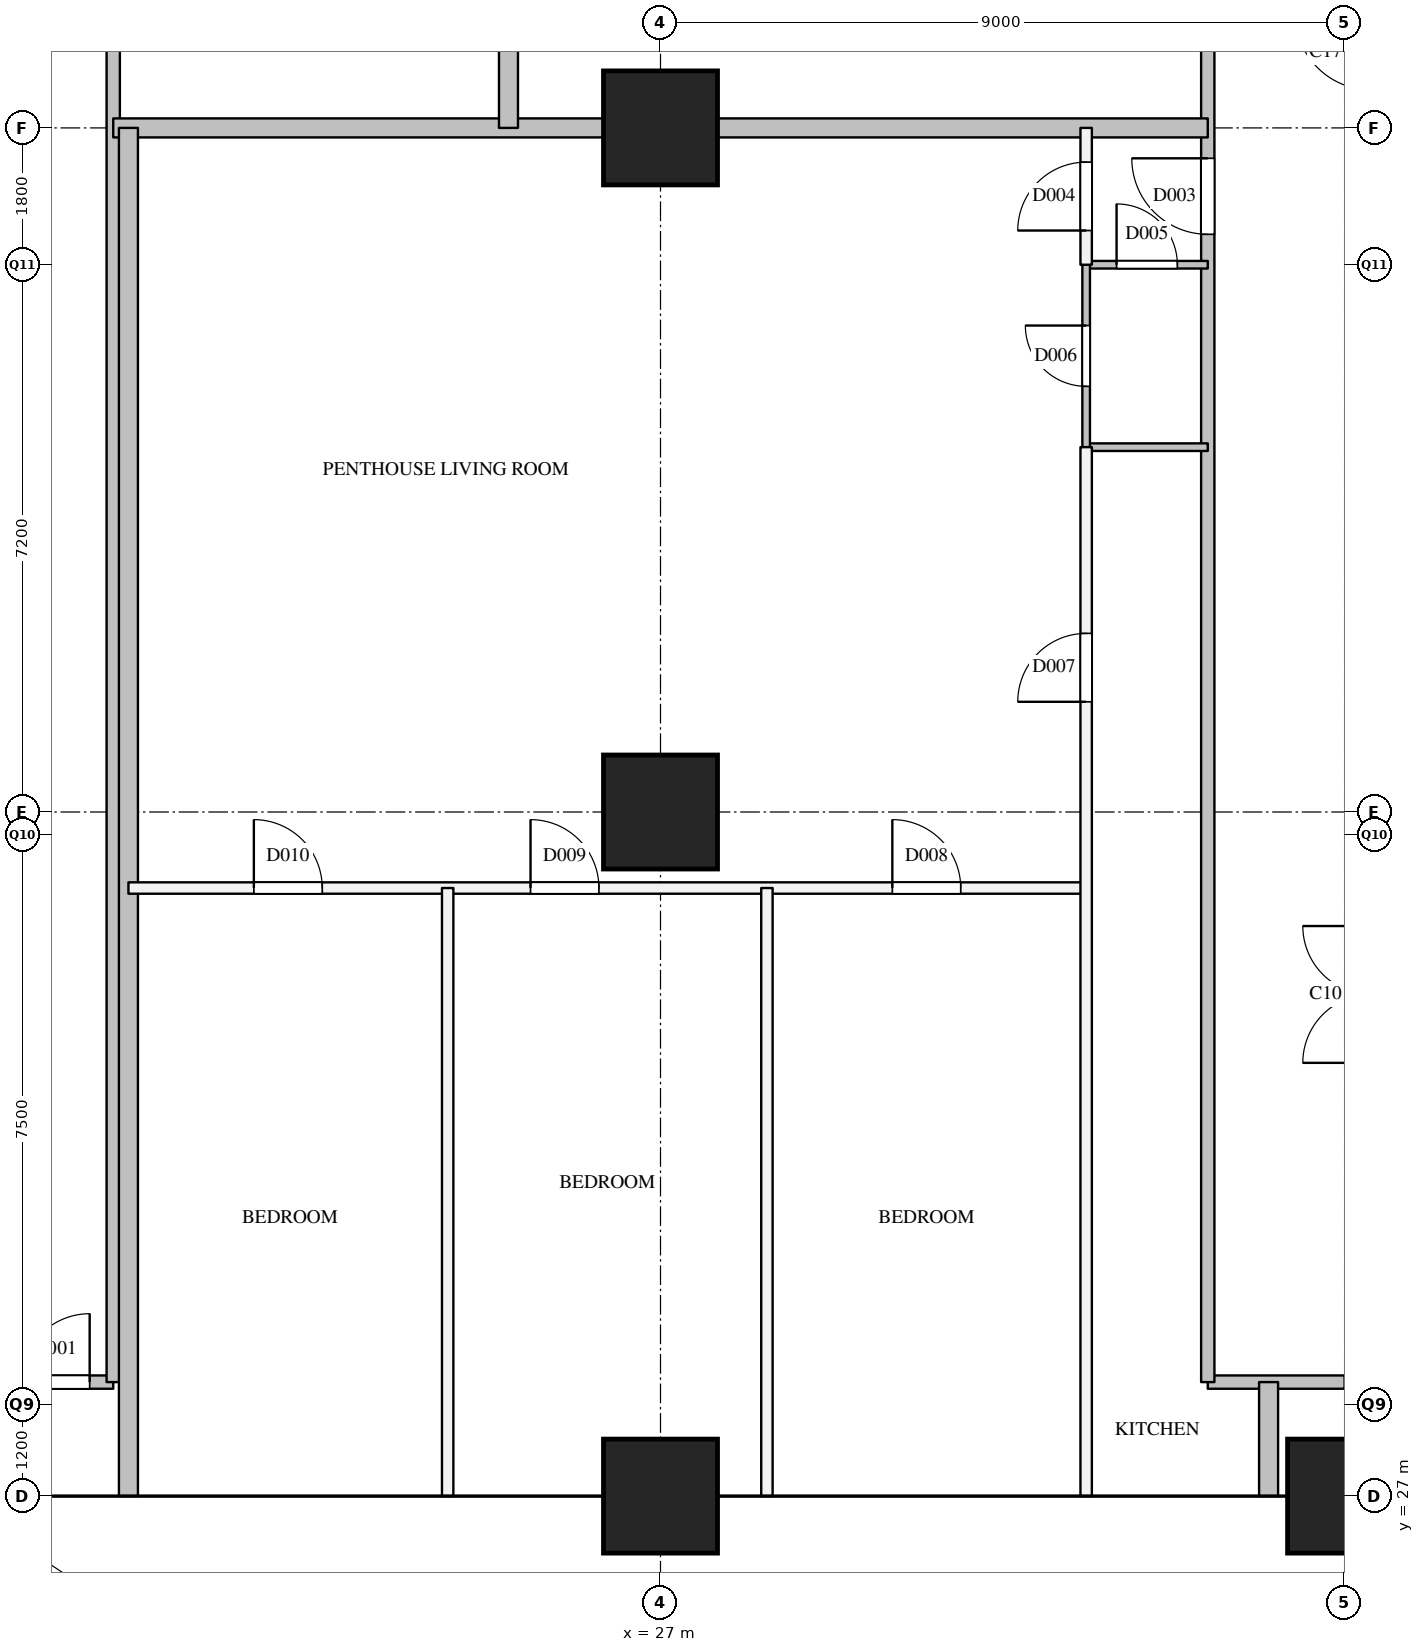
"""IFC4 building model, lengths in metres.
Left out: names, types, materials, properties, quantities, classifications, styles, units other than length and angle.
Written with IfcOpenShell. Run it as: python <this file> out.ifc"""

import sys

from ifc_helpers import new_model, si_unit, direction, frame, frame_2d, origin, origin_2d, place, context, subcontext, project, spatial, rectangle, extrude, element, fill, save


model = new_model("IFC4")
c1 = context("Model", 3, precision=1e-05, world=origin(), true_north=direction((0.0, 1.0)))
c2 = subcontext(c1, "Body", "Model", "MODEL_VIEW")
j1 = project(units=[si_unit("LENGTHUNIT", "METRE"), si_unit("PLANEANGLEUNIT", "RADIAN")], contexts=[c1])
p1 = place(None, origin())
s1 = spatial("IfcSite", under=j1, at=p1, CompositionType="ELEMENT")
p2 = place(p1, origin())
s2 = spatial("IfcBuilding", under=s1, at=p2, CompositionType="ELEMENT")
p3 = place(p2, frame((0.0, 0.0, 170.0)))
s3 = spatial("IfcBuildingStorey", under=s2, at=p3, CompositionType="ELEMENT", Elevation=170.0)
for number, where, z_axis, x_axis in (
    (1, (27.0, 27.0, 0.0), (0.0, 0.0, 1.0), (1.0, 0.0, 0.0)),
    (2, (27.0, 36.0, 0.0), (0.0, 0.0, 1.0), (1.0, 0.0, 0.0)),
    (3, (27.0, 45.0, 0.0), (0.0, 0.0, 1.0), (1.0, 0.0, 0.0)),
    (4, (36.0, 27.0, 0.0), (0.0, 0.0, 1.0), (1.0, 0.0, 0.0)),
):
    element("IfcColumn", number, at=place(p3, frame(where, z_axis=z_axis, x_axis=x_axis)), inside=s3, PredefinedType="COLUMN", context=c2, shape_type="SweptSolid", body=[
        extrude(rectangle(XDim=1.5, YDim=1.5, at=origin_2d()), origin(), (0.0, 0.0, 1.0), 3.9),
    ])
p4 = place(p3, frame((18.0, 28.5, 0.0), z_axis=(0.0, 0.0, 1.0), x_axis=(1.0, 0.0, 0.0)))
e5 = element("IfcWall", 5, at=p4, inside=s3, PredefinedType="PARTITIONING", context=c2, shape_type="SweptSolid", body=[
    extrude(rectangle(XDim=1.8, YDim=0.175, at=frame_2d((0.9, 0.0))), origin(), (0.0, 0.0, 1.0), 3.6),
])
p5 = place(p4, frame((0.59, 0.0, 0.0)))
e6 = element("IfcOpeningElement", 6, at=p5, cuts=e5, PredefinedType="OPENING", context=c2, shape_type="SweptSolid", body=[
    extrude(rectangle(XDim=0.9, YDim=2.1, at=frame_2d((0.45, 1.05))), frame((0.0, 0.097, 0.0), z_axis=(0.0, -1.0, 0.0), x_axis=(1.0, 0.0, 0.0)), (0.0, 0.0, 1.0), 0.195),
])
p6 = place(p3, frame((34.2, 28.5, 0.0), z_axis=(0.0, 0.0, 1.0), x_axis=(1.0, 0.0, 0.0)))
e7 = element("IfcWall", 7, at=p6, inside=s3, PredefinedType="PARTITIONING", context=c2, shape_type="SweptSolid", body=[
    extrude(rectangle(XDim=1.8, YDim=0.175, at=frame_2d((0.9, 0.0))), origin(), (0.0, 0.0, 1.0), 3.6),
])
p7 = place(p3, frame((19.8, 28.5, 0.0), z_axis=(0.0, 0.0, 1.0), x_axis=(0.0, 1.0, 0.0)))
e8 = element("IfcWall", 8, at=p7, inside=s3, PredefinedType="PARTITIONING", context=c2, shape_type="SweptSolid", body=[
    extrude(rectangle(XDim=23.3, YDim=0.175, at=frame_2d((11.65, 0.0))), origin(), (0.0, 0.0, 1.0), 3.6),
])
p8 = place(p3, frame((34.2, 28.5, 0.0), z_axis=(0.0, 0.0, 1.0), x_axis=(0.0, 1.0, 0.0)))
e9 = element("IfcWall", 9, at=p8, inside=s3, PredefinedType="PARTITIONING", context=c2, shape_type="SweptSolid", body=[
    extrude(rectangle(XDim=23.3, YDim=0.175, at=frame_2d((11.65, 0.0))), origin(), (0.0, 0.0, 1.0), 3.6),
])
p9 = place(p8, frame((15.1, 0.0, 0.0)))
e10 = element("IfcOpeningElement", 10, at=p9, cuts=e9, PredefinedType="OPENING", context=c2, shape_type="SweptSolid", body=[
    extrude(rectangle(XDim=1.0, YDim=2.1, at=frame_2d((0.5, 1.05))), frame((0.0, 0.097, 0.0), z_axis=(0.0, -1.0, 0.0), x_axis=(1.0, 0.0, 0.0)), (0.0, 0.0, 1.0), 0.195),
])
p10 = place(p3, frame((20.0, 35.0, 0.0), z_axis=(0.0, 0.0, 1.0), x_axis=(1.0, 0.0, 0.0)))
e11 = element("IfcWall", 11, at=p10, inside=s3, PredefinedType="PARTITIONING", context=c2, shape_type="SweptSolid", body=[
    extrude(rectangle(XDim=12.6, YDim=0.15, at=frame_2d((6.3, 0.0))), origin(), (0.0, 0.0, 1.0), 2.6),
])
p11 = place(p10, frame((10.05, 0.0, 0.0)))
e12 = element("IfcOpeningElement", 12, at=p11, cuts=e11, PredefinedType="OPENING", context=c2, shape_type="SweptSolid", body=[
    extrude(rectangle(XDim=0.9, YDim=2.1, at=frame_2d((0.45, 1.05))), frame((0.0, 0.085, 0.0), z_axis=(0.0, -1.0, 0.0), x_axis=(1.0, 0.0, 0.0)), (0.0, 0.0, 1.0), 0.17),
])
p12 = place(p10, frame((5.29, 0.0, 0.0)))
e13 = element("IfcOpeningElement", 13, at=p12, cuts=e11, PredefinedType="OPENING", context=c2, shape_type="SweptSolid", body=[
    extrude(rectangle(XDim=0.9, YDim=2.1, at=frame_2d((0.45, 1.05))), frame((0.0, 0.085, 0.0), z_axis=(0.0, -1.0, 0.0), x_axis=(1.0, 0.0, 0.0)), (0.0, 0.0, 1.0), 0.17),
])
p13 = place(p10, frame((1.65, 0.0, 0.0)))
e14 = element("IfcOpeningElement", 14, at=p13, cuts=e11, PredefinedType="OPENING", context=c2, shape_type="SweptSolid", body=[
    extrude(rectangle(XDim=0.9, YDim=2.1, at=frame_2d((0.45, 1.05))), frame((0.0, 0.085, 0.0), z_axis=(0.0, -1.0, 0.0), x_axis=(1.0, 0.0, 0.0)), (0.0, 0.0, 1.0), 0.17),
])
for number, where, z_axis, x_axis in (
    (15, (24.2, 27.0, 0.0), (0.0, 0.0, 1.0), (0.0, 1.0, 0.0)),
    (16, (28.4, 27.0, 0.0), (0.0, 0.0, 1.0), (0.0, 1.0, 0.0)),
):
    element("IfcWall", number, at=place(p3, frame(where, z_axis=z_axis, x_axis=x_axis)), inside=s3, PredefinedType="PARTITIONING", context=c2, shape_type="SweptSolid", body=[
        extrude(rectangle(XDim=8.0, YDim=0.15, at=frame_2d((4.0, 0.0))), origin(), (0.0, 0.0, 1.0), 2.6),
    ])
p14 = place(p3, frame((32.6, 27.0, 0.0), z_axis=(0.0, 0.0, 1.0), x_axis=(0.0, 1.0, 0.0)))
e17 = element("IfcWall", 17, at=p14, inside=s3, PredefinedType="PARTITIONING", context=c2, shape_type="SweptSolid", body=[
    extrude(rectangle(XDim=13.8, YDim=0.15, at=frame_2d((6.9, 0.0))), origin(), (0.0, 0.0, 1.0), 2.6),
])
p15 = place(p14, frame((10.45, 0.0, 0.0)))
e18 = element("IfcOpeningElement", 18, at=p15, cuts=e17, PredefinedType="OPENING", context=c2, shape_type="SweptSolid", body=[
    extrude(rectangle(XDim=0.9, YDim=2.1, at=frame_2d((0.45, 1.05))), frame((0.0, 0.085, 0.0), z_axis=(0.0, -1.0, 0.0), x_axis=(1.0, 0.0, 0.0)), (0.0, 0.0, 1.0), 0.17),
])
p16 = place(p3, frame((32.6, 43.2, 0.0), z_axis=(0.0, 0.0, 1.0), x_axis=(0.0, 1.0, 0.0)))
e19 = element("IfcWall", 19, at=p16, inside=s3, PredefinedType="PARTITIONING", context=c2, shape_type="SweptSolid", body=[
    extrude(rectangle(XDim=1.8, YDim=0.15, at=frame_2d((0.9, 0.0))), origin(), (0.0, 0.0, 1.0), 3.6),
])
p17 = place(p16, frame((0.45, 0.0, 0.0)))
e20 = element("IfcOpeningElement", 20, at=p17, cuts=e19, PredefinedType="OPENING", context=c2, shape_type="SweptSolid", body=[
    extrude(rectangle(XDim=0.9, YDim=2.1, at=frame_2d((0.45, 1.05))), frame((0.0, 0.085, 0.0), z_axis=(0.0, -1.0, 0.0), x_axis=(1.0, 0.0, 0.0)), (0.0, 0.0, 1.0), 0.17),
])
p18 = place(p3, frame((19.8, 45.0, 0.0), z_axis=(0.0, 0.0, 1.0), x_axis=(1.0, 0.0, 0.0)))
e21 = element("IfcWall", 21, at=p18, inside=s3, PredefinedType="PARTITIONING", context=c2, shape_type="SweptSolid", body=[
    extrude(rectangle(XDim=14.4, YDim=0.25, at=frame_2d((7.2, 0.0))), origin(), (0.0, 0.0, 1.0), 3.6),
])
p19 = place(p3, frame((20.0, 27.0, 0.0), z_axis=(0.0, 0.0, 1.0), x_axis=(0.0, 1.0, 0.0)))
e22 = element("IfcWall", 22, at=p19, inside=s3, PredefinedType="PARTITIONING", context=c2, shape_type="SweptSolid", body=[
    extrude(rectangle(XDim=18.0, YDim=0.25, at=frame_2d((9.0, 0.0))), origin(), (0.0, 0.0, 1.0), 2.6),
])
p20 = place(p3, frame((25.0, 45.0, 0.0), z_axis=(0.0, 0.0, 1.0), x_axis=(0.0, 1.0, 0.0)))
e23 = element("IfcWall", 23, at=p20, inside=s3, PredefinedType="PARTITIONING", context=c2, shape_type="SweptSolid", body=[
    extrude(rectangle(XDim=9.0, YDim=0.25, at=frame_2d((4.5, 0.0))), origin(), (0.0, 0.0, 1.0), 2.6),
])
p21 = place(p3, frame((35.0, 27.0, 0.0), z_axis=(0.0, 0.0, 1.0), x_axis=(0.0, 1.0, 0.0)))
e24 = element("IfcWall", 24, at=p21, inside=s3, PredefinedType="PARTITIONING", context=c2, shape_type="SweptSolid", body=[
    extrude(rectangle(XDim=1.5, YDim=0.25, at=frame_2d((0.75, 0.0))), origin(), (0.0, 0.0, 1.0), 2.6),
])
p22 = place(p3, frame((32.6, 40.8, 0.0), z_axis=(0.0, 0.0, 1.0), x_axis=(1.0, 0.0, 0.0)))
e25 = element("IfcWall", 25, at=p22, inside=s3, PredefinedType="PARTITIONING", context=c2, shape_type="SweptSolid", body=[
    extrude(rectangle(XDim=1.6, YDim=0.1, at=frame_2d((0.8, 0.0))), origin(), (0.0, 0.0, 1.0), 3.6),
])
p23 = place(p3, frame((32.6, 43.2, 0.0), z_axis=(0.0, 0.0, 1.0), x_axis=(1.0, 0.0, 0.0)))
e26 = element("IfcWall", 26, at=p23, inside=s3, PredefinedType="PARTITIONING", context=c2, shape_type="SweptSolid", body=[
    extrude(rectangle(XDim=1.6, YDim=0.1, at=frame_2d((0.8, 0.0))), origin(), (0.0, 0.0, 1.0), 3.6),
])
p24 = place(p23, frame((0.4, 0.0, 0.0)))
e27 = element("IfcOpeningElement", 27, at=p24, cuts=e26, PredefinedType="OPENING", context=c2, shape_type="SweptSolid", body=[
    extrude(rectangle(XDim=0.8, YDim=2.1, at=frame_2d((0.4, 1.05))), frame((0.0, 0.06, 0.0), z_axis=(0.0, -1.0, 0.0), x_axis=(1.0, 0.0, 0.0)), (0.0, 0.0, 1.0), 0.12),
])
p25 = place(p3, frame((32.6, 40.8, 0.0), z_axis=(0.0, 0.0, 1.0), x_axis=(0.0, 1.0, 0.0)))
e28 = element("IfcWall", 28, at=p25, inside=s3, PredefinedType="PARTITIONING", context=c2, shape_type="SweptSolid", body=[
    extrude(rectangle(XDim=2.4, YDim=0.1, at=frame_2d((1.2, 0.0))), origin(), (0.0, 0.0, 1.0), 3.6),
])
p26 = place(p25, frame((0.8, 0.0, 0.0)))
e29 = element("IfcOpeningElement", 29, at=p26, cuts=e28, PredefinedType="OPENING", context=c2, shape_type="SweptSolid", body=[
    extrude(rectangle(XDim=0.8, YDim=2.1, at=frame_2d((0.4, 1.05))), frame((0.0, 0.06, 0.0), z_axis=(0.0, -1.0, 0.0), x_axis=(1.0, 0.0, 0.0)), (0.0, 0.0, 1.0), 0.12),
])
p27 = place(p5, origin())
e30 = element("IfcDoor", 30, at=p27, inside=s3, OperationType="SINGLE_SWING_RIGHT", PredefinedType="DOOR", context=c2, shape_type="SweptSolid", body=[
    extrude(rectangle(XDim=0.9, YDim=2.1, at=frame_2d((0.45, 1.05))), frame((0.0, 0.025, 0.0), z_axis=(0.0, -1.0, 0.0), x_axis=(1.0, 0.0, 0.0)), (0.0, 0.0, 1.0), 0.05),
])
fill(e6, e30)
p28 = place(p9, origin())
e31 = element("IfcDoor", 31, at=p28, inside=s3, OperationType="SINGLE_SWING_RIGHT", PredefinedType="DOOR", context=c2, shape_type="SweptSolid", body=[
    extrude(rectangle(XDim=1.0, YDim=2.1, at=frame_2d((0.5, 1.05))), frame((0.0, 0.025, 0.0), z_axis=(0.0, -1.0, 0.0), x_axis=(1.0, 0.0, 0.0)), (0.0, 0.0, 1.0), 0.05),
])
fill(e10, e31)
p29 = place(p17, origin())
e32 = element("IfcDoor", 32, at=p29, inside=s3, OperationType="SINGLE_SWING_LEFT", PredefinedType="DOOR", context=c2, shape_type="SweptSolid", body=[
    extrude(rectangle(XDim=0.9, YDim=2.1, at=frame_2d((0.45, 1.05))), frame((0.0, 0.025, 0.0), z_axis=(0.0, -1.0, 0.0), x_axis=(1.0, 0.0, 0.0)), (0.0, 0.0, 1.0), 0.05),
])
fill(e20, e32)
p30 = place(p24, origin())
e33 = element("IfcDoor", 33, at=p30, inside=s3, OperationType="SINGLE_SWING_LEFT", PredefinedType="DOOR", context=c2, shape_type="SweptSolid", body=[
    extrude(rectangle(XDim=0.8, YDim=2.1, at=frame_2d((0.4, 1.05))), frame((0.0, 0.025, 0.0), z_axis=(0.0, -1.0, 0.0), x_axis=(1.0, 0.0, 0.0)), (0.0, 0.0, 1.0), 0.05),
])
fill(e27, e33)
p31 = place(p26, origin())
e34 = element("IfcDoor", 34, at=p31, inside=s3, OperationType="SINGLE_SWING_RIGHT", PredefinedType="DOOR", context=c2, shape_type="SweptSolid", body=[
    extrude(rectangle(XDim=0.8, YDim=2.1, at=frame_2d((0.4, 1.05))), frame((0.0, 0.025, 0.0), z_axis=(0.0, -1.0, 0.0), x_axis=(1.0, 0.0, 0.0)), (0.0, 0.0, 1.0), 0.05),
])
fill(e29, e34)
p32 = place(p15, origin())
e35 = element("IfcDoor", 35, at=p32, inside=s3, OperationType="SINGLE_SWING_LEFT", PredefinedType="DOOR", context=c2, shape_type="SweptSolid", body=[
    extrude(rectangle(XDim=0.9, YDim=2.1, at=frame_2d((0.45, 1.05))), frame((0.0, 0.025, 0.0), z_axis=(0.0, -1.0, 0.0), x_axis=(1.0, 0.0, 0.0)), (0.0, 0.0, 1.0), 0.05),
])
fill(e18, e35)
p33 = place(p11, origin())
e36 = element("IfcDoor", 36, at=p33, inside=s3, OperationType="SINGLE_SWING_LEFT", PredefinedType="DOOR", context=c2, shape_type="SweptSolid", body=[
    extrude(rectangle(XDim=0.9, YDim=2.1, at=frame_2d((0.45, 1.05))), frame((0.0, 0.025, 0.0), z_axis=(0.0, -1.0, 0.0), x_axis=(1.0, 0.0, 0.0)), (0.0, 0.0, 1.0), 0.05),
])
fill(e12, e36)
p34 = place(p12, origin())
e37 = element("IfcDoor", 37, at=p34, inside=s3, OperationType="SINGLE_SWING_LEFT", PredefinedType="DOOR", context=c2, shape_type="SweptSolid", body=[
    extrude(rectangle(XDim=0.9, YDim=2.1, at=frame_2d((0.45, 1.05))), frame((0.0, 0.025, 0.0), z_axis=(0.0, -1.0, 0.0), x_axis=(1.0, 0.0, 0.0)), (0.0, 0.0, 1.0), 0.05),
])
fill(e13, e37)
p35 = place(p13, origin())
e38 = element("IfcDoor", 38, at=p35, inside=s3, OperationType="SINGLE_SWING_LEFT", PredefinedType="DOOR", context=c2, shape_type="SweptSolid", body=[
    extrude(rectangle(XDim=0.9, YDim=2.1, at=frame_2d((0.45, 1.05))), frame((0.0, 0.025, 0.0), z_axis=(0.0, -1.0, 0.0), x_axis=(1.0, 0.0, 0.0)), (0.0, 0.0, 1.0), 0.05),
])
fill(e14, e38)
save(model, sys.argv[1])
